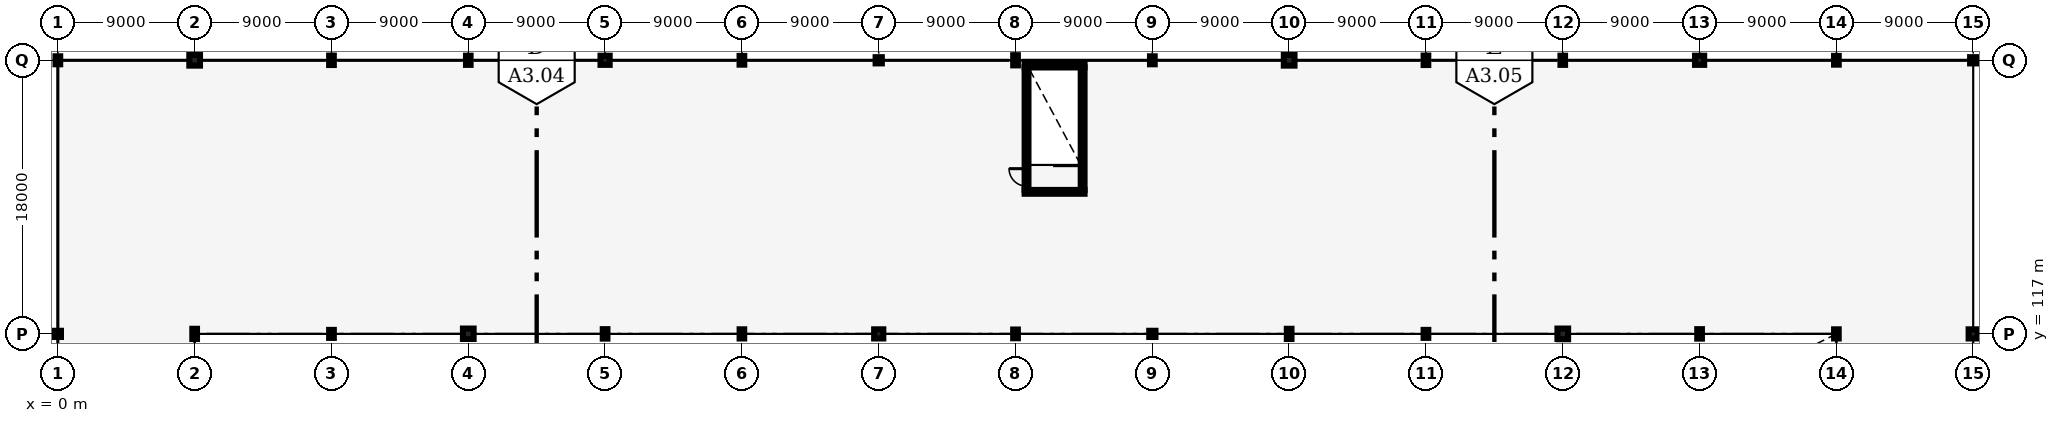
"""IFC4 building model, lengths in metres.
Left out: names, types, materials, properties, quantities, classifications, styles, units other than length and angle.
Written with IfcOpenShell. Run it as: python <this file> out.ifc"""

import sys

from ifc_helpers import new_model, si_unit, direction, frame, frame_2d, origin, origin_2d, place, context, subcontext, project, spatial, rectangle, hollow_circle, i_section, extrude, element, fill, save


model = new_model("IFC4")
c1 = context("Model", 3, precision=1e-05, world=origin(), true_north=direction((0.0, 1.0)))
c2 = subcontext(c1, "Body", "Model", "MODEL_VIEW")
j1 = project(units=[si_unit("LENGTHUNIT", "METRE"), si_unit("PLANEANGLEUNIT", "RADIAN")], contexts=[c1])
p1 = place(None, origin())
s1 = spatial("IfcSite", under=j1, at=p1, CompositionType="ELEMENT")
p2 = place(p1, origin())
s2 = spatial("IfcBuilding", under=s1, at=p2, CompositionType="ELEMENT")
p3 = place(p2, frame((0.0, 0.0, 6.0)))
s3 = spatial("IfcBuildingStorey", under=s2, at=p3, CompositionType="ELEMENT", Elevation=6.0)
p4 = place(p3, frame((0.0, 117.0, 0.0), z_axis=(0.0, 0.0, 1.0), x_axis=(1.0, 0.0, 0.0)))
e1 = element("IfcColumn", 1, at=p4, inside=s3, PredefinedType="COLUMN", context=c2, shape_type="SweptSolid", body=[
    extrude(hollow_circle(Radius=0.203, WallThickness=0.016, at=origin_2d()), origin(), (0.0, 0.0, 1.0), 6.0),
])
p5 = place(p3, frame((0.0, 135.0, 0.0), z_axis=(0.0, 0.0, 1.0), x_axis=(1.0, 0.0, 0.0)))
e2 = element("IfcColumn", 2, at=p5, inside=s3, PredefinedType="COLUMN", context=c2, shape_type="SweptSolid", body=[
    extrude(i_section(OverallWidth=0.306, OverallDepth=0.524, WebThickness=0.021, FlangeThickness=0.04, FilletRadius=0.027, at=origin_2d()), origin(), (0.0, 0.0, 1.0), 6.0),
])
p6 = place(p3, frame((9.0, 117.0, 0.0), z_axis=(0.0, 0.0, 1.0), x_axis=(1.0, 0.0, 0.0)))
e3 = element("IfcColumn", 3, at=p6, inside=s3, PredefinedType="COLUMN", context=c2, shape_type="SweptSolid", body=[
    extrude(i_section(OverallWidth=0.305, OverallDepth=0.668, WebThickness=0.021, FlangeThickness=0.04, FilletRadius=0.027, at=origin_2d()), origin(), (0.0, 0.0, 1.0), 6.0),
])
p7 = place(p3, frame((9.0, 135.0, 0.0), z_axis=(0.0, 0.0, 1.0), x_axis=(1.0, 0.0, 0.0)))
e4 = element("IfcColumn", 4, at=p7, inside=s3, PredefinedType="COLUMN", context=c2, shape_type="SweptSolid", body=[
    extrude(rectangle(XDim=0.7, YDim=0.7, at=origin_2d()), origin(), (0.0, 0.0, 1.0), 6.0),
])
p8 = place(p3, frame((18.0, 117.0, 0.0), z_axis=(0.0, 0.0, 1.0), x_axis=(1.0, 0.0, 0.0)))
e5 = element("IfcColumn", 5, at=p8, inside=s3, PredefinedType="COLUMN", context=c2, shape_type="SweptSolid", body=[
    extrude(i_section(OverallWidth=0.306, OverallDepth=0.524, WebThickness=0.021, FlangeThickness=0.04, FilletRadius=0.027, at=origin_2d()), origin(), (0.0, 0.0, 1.0), 6.0),
])
p9 = place(p3, frame((18.0, 135.0, 0.0), z_axis=(0.0, 0.0, 1.0), x_axis=(1.0, 0.0, 0.0)))
e6 = element("IfcColumn", 6, at=p9, inside=s3, PredefinedType="COLUMN", context=c2, shape_type="SweptSolid", body=[
    extrude(i_section(OverallWidth=0.305, OverallDepth=0.62, WebThickness=0.021, FlangeThickness=0.04, FilletRadius=0.027, at=origin_2d()), origin(), (0.0, 0.0, 1.0), 6.0),
])
p10 = place(p3, frame((27.0, 117.0, 0.0), z_axis=(0.0, 0.0, 1.0), x_axis=(1.0, 0.0, 0.0)))
e7 = element("IfcColumn", 7, at=p10, inside=s3, PredefinedType="COLUMN", context=c2, shape_type="SweptSolid", body=[
    extrude(rectangle(XDim=0.7, YDim=0.7, at=origin_2d()), origin(), (0.0, 0.0, 1.0), 6.0),
])
p11 = place(p3, frame((27.0, 135.0, 0.0), z_axis=(0.0, 0.0, 1.0), x_axis=(1.0, 0.0, 0.0)))
e8 = element("IfcColumn", 8, at=p11, inside=s3, PredefinedType="COLUMN", context=c2, shape_type="SweptSolid", body=[
    extrude(i_section(OverallWidth=0.3, OverallDepth=0.6, WebThickness=0.015, FlangeThickness=0.03, FilletRadius=0.027, at=origin_2d()), origin(), (0.0, 0.0, 1.0), 6.0),
])
p12 = place(p3, frame((36.0, 117.0, 0.0), z_axis=(0.0, 0.0, 1.0), x_axis=(1.0, 0.0, 0.0)))
e9 = element("IfcColumn", 9, at=p12, inside=s3, PredefinedType="COLUMN", context=c2, shape_type="SweptSolid", body=[
    extrude(i_section(OverallWidth=0.305, OverallDepth=0.62, WebThickness=0.021, FlangeThickness=0.04, FilletRadius=0.027, at=origin_2d()), origin(), (0.0, 0.0, 1.0), 6.0),
])
p13 = place(p3, frame((36.0, 135.0, 0.0), z_axis=(0.0, 0.0, 1.0), x_axis=(1.0, 0.0, 0.0)))
e10 = element("IfcColumn", 10, at=p13, inside=s3, PredefinedType="COLUMN", context=c2, shape_type="SweptSolid", body=[
    extrude(rectangle(XDim=0.6, YDim=0.6, at=origin_2d()), origin(), (0.0, 0.0, 1.0), 6.0),
])
p14 = place(p3, frame((45.0, 117.0, 0.0), z_axis=(0.0, 0.0, 1.0), x_axis=(1.0, 0.0, 0.0)))
e11 = element("IfcColumn", 11, at=p14, inside=s3, PredefinedType="COLUMN", context=c2, shape_type="SweptSolid", body=[
    extrude(i_section(OverallWidth=0.3, OverallDepth=0.6, WebThickness=0.015, FlangeThickness=0.03, FilletRadius=0.027, at=origin_2d()), origin(), (0.0, 0.0, 1.0), 6.0),
])
p15 = place(p3, frame((45.0, 135.0, 0.0), z_axis=(0.0, 0.0, 1.0), x_axis=(1.0, 0.0, 0.0)))
e12 = element("IfcColumn", 12, at=p15, inside=s3, PredefinedType="COLUMN", context=c2, shape_type="SweptSolid", body=[
    extrude(i_section(OverallWidth=0.306, OverallDepth=0.572, WebThickness=0.021, FlangeThickness=0.04, FilletRadius=0.027, at=origin_2d()), origin(), (0.0, 0.0, 1.0), 6.0),
])
p16 = place(p3, frame((54.0, 117.0, 0.0), z_axis=(0.0, 0.0, 1.0), x_axis=(1.0, 0.0, 0.0)))
e13 = element("IfcColumn", 13, at=p16, inside=s3, PredefinedType="COLUMN", context=c2, shape_type="SweptSolid", body=[
    extrude(rectangle(XDim=0.6, YDim=0.6, at=origin_2d()), origin(), (0.0, 0.0, 1.0), 6.0),
])
p17 = place(p3, frame((54.0, 135.0, 0.0), z_axis=(0.0, 0.0, 1.0), x_axis=(1.0, 0.0, 0.0)))
e14 = element("IfcColumn", 14, at=p17, inside=s3, PredefinedType="COLUMN", context=c2, shape_type="SweptSolid", body=[
    extrude(hollow_circle(Radius=0.203, WallThickness=0.016, at=origin_2d()), origin(), (0.0, 0.0, 1.0), 6.0),
])
p18 = place(p3, frame((63.0, 117.0, 0.0), z_axis=(0.0, 0.0, 1.0), x_axis=(1.0, 0.0, 0.0)))
e15 = element("IfcColumn", 15, at=p18, inside=s3, PredefinedType="COLUMN", context=c2, shape_type="SweptSolid", body=[
    extrude(i_section(OverallWidth=0.306, OverallDepth=0.572, WebThickness=0.021, FlangeThickness=0.04, FilletRadius=0.027, at=origin_2d()), origin(), (0.0, 0.0, 1.0), 6.0),
])
p19 = place(p3, frame((63.0, 135.0, 0.0), z_axis=(0.0, 0.0, 1.0), x_axis=(1.0, 0.0, 0.0)))
e16 = element("IfcColumn", 16, at=p19, inside=s3, PredefinedType="COLUMN", context=c2, shape_type="SweptSolid", body=[
    extrude(i_section(OverallWidth=0.305, OverallDepth=0.668, WebThickness=0.021, FlangeThickness=0.04, FilletRadius=0.027, at=origin_2d()), origin(), (0.0, 0.0, 1.0), 6.0),
])
p20 = place(p3, frame((72.0, 117.0, 0.0), z_axis=(0.0, 0.0, 1.0), x_axis=(1.0, 0.0, 0.0)))
e17 = element("IfcColumn", 17, at=p20, inside=s3, PredefinedType="COLUMN", context=c2, shape_type="SweptSolid", body=[
    extrude(hollow_circle(Radius=0.203, WallThickness=0.016, at=origin_2d()), origin(), (0.0, 0.0, 1.0), 6.0),
])
p21 = place(p3, frame((72.0, 135.0, 0.0), z_axis=(0.0, 0.0, 1.0), x_axis=(1.0, 0.0, 0.0)))
e18 = element("IfcColumn", 18, at=p21, inside=s3, PredefinedType="COLUMN", context=c2, shape_type="SweptSolid", body=[
    extrude(i_section(OverallWidth=0.306, OverallDepth=0.524, WebThickness=0.021, FlangeThickness=0.04, FilletRadius=0.027, at=origin_2d()), origin(), (0.0, 0.0, 1.0), 6.0),
])
p22 = place(p3, frame((81.0, 117.0, 0.0), z_axis=(0.0, 0.0, 1.0), x_axis=(1.0, 0.0, 0.0)))
e19 = element("IfcColumn", 19, at=p22, inside=s3, PredefinedType="COLUMN", context=c2, shape_type="SweptSolid", body=[
    extrude(i_section(OverallWidth=0.305, OverallDepth=0.668, WebThickness=0.021, FlangeThickness=0.04, FilletRadius=0.027, at=origin_2d()), origin(), (0.0, 0.0, 1.0), 6.0),
])
p23 = place(p3, frame((81.0, 135.0, 0.0), z_axis=(0.0, 0.0, 1.0), x_axis=(1.0, 0.0, 0.0)))
e20 = element("IfcColumn", 20, at=p23, inside=s3, PredefinedType="COLUMN", context=c2, shape_type="SweptSolid", body=[
    extrude(rectangle(XDim=0.7, YDim=0.7, at=origin_2d()), origin(), (0.0, 0.0, 1.0), 6.0),
])
p24 = place(p3, frame((90.0, 117.0, 0.0), z_axis=(0.0, 0.0, 1.0), x_axis=(1.0, 0.0, 0.0)))
e21 = element("IfcColumn", 21, at=p24, inside=s3, PredefinedType="COLUMN", context=c2, shape_type="SweptSolid", body=[
    extrude(i_section(OverallWidth=0.306, OverallDepth=0.524, WebThickness=0.021, FlangeThickness=0.04, FilletRadius=0.027, at=origin_2d()), origin(), (0.0, 0.0, 1.0), 6.0),
])
p25 = place(p3, frame((90.0, 135.0, 0.0), z_axis=(0.0, 0.0, 1.0), x_axis=(1.0, 0.0, 0.0)))
e22 = element("IfcColumn", 22, at=p25, inside=s3, PredefinedType="COLUMN", context=c2, shape_type="SweptSolid", body=[
    extrude(i_section(OverallWidth=0.305, OverallDepth=0.62, WebThickness=0.021, FlangeThickness=0.04, FilletRadius=0.027, at=origin_2d()), origin(), (0.0, 0.0, 1.0), 6.0),
])
p26 = place(p3, frame((99.0, 117.0, 0.0), z_axis=(0.0, 0.0, 1.0), x_axis=(1.0, 0.0, 0.0)))
e23 = element("IfcColumn", 23, at=p26, inside=s3, PredefinedType="COLUMN", context=c2, shape_type="SweptSolid", body=[
    extrude(rectangle(XDim=0.7, YDim=0.7, at=origin_2d()), origin(), (0.0, 0.0, 1.0), 6.0),
])
p27 = place(p3, frame((99.0, 135.0, 0.0), z_axis=(0.0, 0.0, 1.0), x_axis=(1.0, 0.0, 0.0)))
e24 = element("IfcColumn", 24, at=p27, inside=s3, PredefinedType="COLUMN", context=c2, shape_type="SweptSolid", body=[
    extrude(i_section(OverallWidth=0.3, OverallDepth=0.6, WebThickness=0.015, FlangeThickness=0.03, FilletRadius=0.027, at=origin_2d()), origin(), (0.0, 0.0, 1.0), 6.0),
])
p28 = place(p3, frame((108.0, 117.0, 0.0), z_axis=(0.0, 0.0, 1.0), x_axis=(1.0, 0.0, 0.0)))
e25 = element("IfcColumn", 25, at=p28, inside=s3, PredefinedType="COLUMN", context=c2, shape_type="SweptSolid", body=[
    extrude(i_section(OverallWidth=0.305, OverallDepth=0.62, WebThickness=0.021, FlangeThickness=0.04, FilletRadius=0.027, at=origin_2d()), origin(), (0.0, 0.0, 1.0), 6.0),
])
p29 = place(p3, frame((108.0, 135.0, 0.0), z_axis=(0.0, 0.0, 1.0), x_axis=(1.0, 0.0, 0.0)))
e26 = element("IfcColumn", 26, at=p29, inside=s3, PredefinedType="COLUMN", context=c2, shape_type="SweptSolid", body=[
    extrude(rectangle(XDim=0.6, YDim=0.6, at=origin_2d()), origin(), (0.0, 0.0, 1.0), 6.0),
])
p30 = place(p3, frame((117.0, 117.0, 0.0), z_axis=(0.0, 0.0, 1.0), x_axis=(1.0, 0.0, 0.0)))
e27 = element("IfcColumn", 27, at=p30, inside=s3, PredefinedType="COLUMN", context=c2, shape_type="SweptSolid", body=[
    extrude(i_section(OverallWidth=0.3, OverallDepth=0.6, WebThickness=0.015, FlangeThickness=0.03, FilletRadius=0.027, at=origin_2d()), origin(), (0.0, 0.0, 1.0), 6.0),
])
p31 = place(p3, frame((117.0, 135.0, 0.0), z_axis=(0.0, 0.0, 1.0), x_axis=(1.0, 0.0, 0.0)))
e28 = element("IfcColumn", 28, at=p31, inside=s3, PredefinedType="COLUMN", context=c2, shape_type="SweptSolid", body=[
    extrude(i_section(OverallWidth=0.306, OverallDepth=0.572, WebThickness=0.021, FlangeThickness=0.04, FilletRadius=0.027, at=origin_2d()), origin(), (0.0, 0.0, 1.0), 6.0),
])
p32 = place(p3, frame((126.0, 117.0, 0.0), z_axis=(0.0, 0.0, 1.0), x_axis=(1.0, 0.0, 0.0)))
e29 = element("IfcColumn", 29, at=p32, inside=s3, PredefinedType="COLUMN", context=c2, shape_type="SweptSolid", body=[
    extrude(rectangle(XDim=0.6, YDim=0.6, at=origin_2d()), origin(), (0.0, 0.0, 1.0), 6.0),
])
p33 = place(p3, frame((126.0, 135.0, 0.0), z_axis=(0.0, 0.0, 1.0), x_axis=(1.0, 0.0, 0.0)))
e30 = element("IfcColumn", 30, at=p33, inside=s3, PredefinedType="COLUMN", context=c2, shape_type="SweptSolid", body=[
    extrude(hollow_circle(Radius=0.203, WallThickness=0.016, at=origin_2d()), origin(), (0.0, 0.0, 1.0), 6.0),
])
p34 = place(p3, frame((63.725, 126.47, 0.0), z_axis=(0.0, 0.0, 1.0), x_axis=(0.0, 1.0, 0.0)))
e31 = element("IfcWall", 31, at=p34, inside=s3, PredefinedType="SHEAR", context=c2, shape_type="SweptSolid", body=[
    extrude(rectangle(XDim=8.06, YDim=0.25, at=frame_2d((4.03, 0.0))), origin(), (0.0, 0.0, 1.0), 5.65),
])
p35 = place(p34, frame((0.25, 0.0, 0.0)))
e32 = element("IfcOpeningElement", 32, at=p35, cuts=e31, PredefinedType="OPENING", context=c2, shape_type="SweptSolid", body=[
    extrude(rectangle(XDim=1.15, YDim=2.15, at=frame_2d((0.575, 1.075))), frame((0.0, 0.135, 0.0), z_axis=(0.0, -1.0, 0.0), x_axis=(1.0, 0.0, 0.0)), (0.0, 0.0, 1.0), 0.27),
])
p36 = place(p3, frame((67.415, 126.47, 0.0), z_axis=(0.0, 0.0, 1.0), x_axis=(0.0, 1.0, 0.0)))
e33 = element("IfcWall", 33, at=p36, inside=s3, PredefinedType="SHEAR", context=c2, shape_type="SweptSolid", body=[
    extrude(rectangle(XDim=8.06, YDim=0.25, at=frame_2d((4.03, 0.0))), origin(), (0.0, 0.0, 1.0), 5.65),
])
for number, where, z_axis, x_axis in (
    (34, (63.6, 126.345, 0.0), (0.0, 0.0, 1.0), (1.0, 0.0, 0.0)),
    (35, (63.6, 134.655, 0.0), (0.0, 0.0, 1.0), (1.0, 0.0, 0.0)),
):
    element("IfcWall", number, at=place(p3, frame(where, z_axis=z_axis, x_axis=x_axis)), inside=s3, PredefinedType="SHEAR", context=c2, shape_type="SweptSolid", body=[
        extrude(rectangle(XDim=3.94, YDim=0.25, at=frame_2d((1.97, 0.0))), origin(), (0.0, 0.0, 1.0), 5.65),
    ])
p37 = place(p35, origin())
e36 = element("IfcDoor", 36, at=p37, inside=s3, OperationType="SINGLE_SWING_RIGHT", PredefinedType="DOOR", context=c2, shape_type="SweptSolid", body=[
    extrude(rectangle(XDim=1.15, YDim=2.15, at=frame_2d((0.575, 1.075))), frame((0.0, 0.025, 0.0), z_axis=(0.0, -1.0, 0.0), x_axis=(1.0, 0.0, 0.0)), (0.0, 0.0, 1.0), 0.05),
])
fill(e32, e36)
save(model, sys.argv[1])
